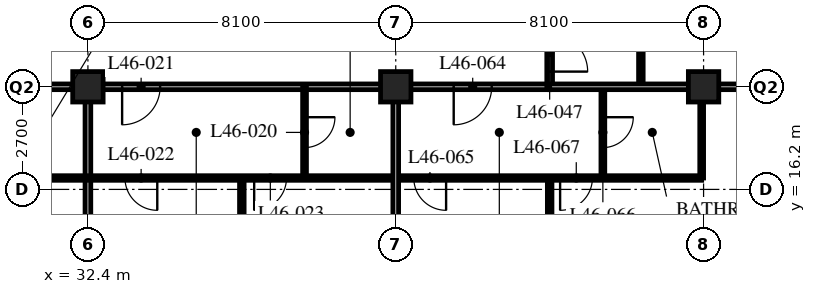
"""IFC4 building model, lengths in metres.
Left out: names, types, materials, properties, quantities, classifications, styles, units other than length and angle.
Written with IfcOpenShell. Run it as: python <this file> out.ifc"""

import sys

from ifc_helpers import new_model, si_unit, direction, frame, frame_2d, origin, origin_2d, place, context, subcontext, project, spatial, rectangle, hollow_rectangle, extrude, element, fill, save


model = new_model("IFC4")
c1 = context("Model", 3, precision=1e-05, world=origin(), true_north=direction((0.0, 1.0)))
c2 = subcontext(c1, "Body", "Model", "MODEL_VIEW")
j1 = project(units=[si_unit("LENGTHUNIT", "METRE"), si_unit("PLANEANGLEUNIT", "RADIAN")], contexts=[c1])
p1 = place(None, origin())
s1 = spatial("IfcSite", under=j1, at=p1, CompositionType="ELEMENT")
p2 = place(p1, origin())
s2 = spatial("IfcBuilding", under=s1, at=p2, CompositionType="ELEMENT")
p3 = place(p2, frame((0.0, 0.0, 181.2)))
s3 = spatial("IfcBuildingStorey", under=s2, at=p3, CompositionType="ELEMENT", Elevation=181.2)
for number, where, z_axis, x_axis in (
    (1, (32.4, 18.9, 0.0), (0.0, 0.0, 1.0), (1.0, 0.0, 0.0)),
    (2, (40.5, 18.9, 0.0), (0.0, 0.0, 1.0), (1.0, 0.0, 0.0)),
    (3, (48.6, 18.9, 0.0), (0.0, 0.0, 1.0), (1.0, 0.0, 0.0)),
):
    element("IfcColumn", number, at=place(p3, frame(where, z_axis=z_axis, x_axis=x_axis)), inside=s3, PredefinedType="COLUMN", context=c2, shape_type="SweptSolid", body=[
        extrude(hollow_rectangle(XDim=0.8, YDim=0.8, WallThickness=0.08, at=origin_2d()), origin(), (0.0, 0.0, 1.0), 3.6),
    ])
p4 = place(p3, frame((12.15, 18.9, 0.0), z_axis=(0.0, 0.0, 1.0), x_axis=(1.0, 0.0, 0.0)))
e4 = element("IfcWall", 4, at=p4, inside=s3, PredefinedType="PARTITIONING", context=c2, shape_type="SweptSolid", body=[
    extrude(rectangle(XDim=32.4, YDim=0.15, at=frame_2d((16.2, 0.0))), origin(), (0.0, 0.0, 1.0), 2.778),
])
p5 = place(p4, frame((4.95, 0.0, 0.0)))
e5 = element("IfcOpeningElement", 5, at=p5, cuts=e4, PredefinedType="OPENING", context=c2, shape_type="SweptSolid", body=[
    extrude(rectangle(XDim=1.0, YDim=2.1, at=frame_2d((0.5, 1.05))), frame((0.0, 0.085, 0.0), z_axis=(0.0, -1.0, 0.0), x_axis=(1.0, 0.0, 0.0)), (0.0, 0.0, 1.0), 0.17),
])
p6 = place(p4, frame((13.05, 0.0, 0.0)))
e6 = element("IfcOpeningElement", 6, at=p6, cuts=e4, PredefinedType="OPENING", context=c2, shape_type="SweptSolid", body=[
    extrude(rectangle(XDim=1.0, YDim=2.1, at=frame_2d((0.5, 1.05))), frame((0.0, 0.085, 0.0), z_axis=(0.0, -1.0, 0.0), x_axis=(1.0, 0.0, 0.0)), (0.0, 0.0, 1.0), 0.17),
])
p7 = place(p4, frame((21.15, 0.0, 0.0)))
e7 = element("IfcOpeningElement", 7, at=p7, cuts=e4, PredefinedType="OPENING", context=c2, shape_type="SweptSolid", body=[
    extrude(rectangle(XDim=1.0, YDim=2.1, at=frame_2d((0.5, 1.05))), frame((0.0, 0.085, 0.0), z_axis=(0.0, -1.0, 0.0), x_axis=(1.0, 0.0, 0.0)), (0.0, 0.0, 1.0), 0.17),
])
p8 = place(p4, frame((1.525, 0.0, 0.0)))
e8 = element("IfcOpeningElement", 8, at=p8, cuts=e4, PredefinedType="OPENING", context=c2, shape_type="SweptSolid", body=[
    extrude(rectangle(XDim=1.0, YDim=2.1, at=frame_2d((0.5, 1.05))), frame((0.0, 0.085, 0.0), z_axis=(0.0, -1.0, 0.0), x_axis=(1.0, 0.0, 0.0)), (0.0, 0.0, 1.0), 0.17),
])
p9 = place(p4, frame((29.875, 0.0, 0.0)))
e9 = element("IfcOpeningElement", 9, at=p9, cuts=e4, PredefinedType="OPENING", context=c2, shape_type="SweptSolid", body=[
    extrude(rectangle(XDim=1.0, YDim=2.1, at=frame_2d((0.5, 1.05))), frame((0.0, 0.085, 0.0), z_axis=(0.0, -1.0, 0.0), x_axis=(1.0, 0.0, 0.0)), (0.0, 0.0, 1.0), 0.17),
])
p10 = place(p3, frame((44.55, 18.9, 0.0), z_axis=(0.0, 0.0, 1.0), x_axis=(0.0, 1.0, 0.0)))
e10 = element("IfcWall", 10, at=p10, inside=s3, PredefinedType="PARTITIONING", context=c2, shape_type="SweptSolid", body=[
    extrude(rectangle(XDim=28.35, YDim=0.15, at=frame_2d((14.175, 0.0))), origin(), (0.0, 0.0, 1.0), 3.39),
])
p11 = place(p10, frame((0.4, 0.0, 0.0)))
e11 = element("IfcOpeningElement", 11, at=p11, cuts=e10, PredefinedType="OPENING", context=c2, shape_type="SweptSolid", body=[
    extrude(rectangle(XDim=1.0, YDim=2.1, at=frame_2d((0.5, 1.05))), frame((0.0, 0.085, 0.0), z_axis=(0.0, -1.0, 0.0), x_axis=(1.0, 0.0, 0.0)), (0.0, 0.0, 1.0), 0.17),
])
p12 = place(p10, frame((10.45, 0.0, 0.0)))
e12 = element("IfcOpeningElement", 12, at=p12, cuts=e10, PredefinedType="OPENING", context=c2, shape_type="SweptSolid", body=[
    extrude(rectangle(XDim=1.0, YDim=2.1, at=frame_2d((0.5, 1.05))), frame((0.0, 0.085, 0.0), z_axis=(0.0, -1.0, 0.0), x_axis=(1.0, 0.0, 0.0)), (0.0, 0.0, 1.0), 0.17),
])
p13 = place(p10, frame((14.5, 0.0, 0.0)))
e13 = element("IfcOpeningElement", 13, at=p13, cuts=e10, PredefinedType="OPENING", context=c2, shape_type="SweptSolid", body=[
    extrude(rectangle(XDim=1.0, YDim=2.1, at=frame_2d((0.5, 1.05))), frame((0.0, 0.085, 0.0), z_axis=(0.0, -1.0, 0.0), x_axis=(1.0, 0.0, 0.0)), (0.0, 0.0, 1.0), 0.17),
])
p14 = place(p10, frame((16.6, 0.0, 0.0)))
e14 = element("IfcOpeningElement", 14, at=p14, cuts=e10, PredefinedType="OPENING", context=c2, shape_type="SweptSolid", body=[
    extrude(rectangle(XDim=1.0, YDim=2.1, at=frame_2d((0.5, 1.05))), frame((0.0, 0.085, 0.0), z_axis=(0.0, -1.0, 0.0), x_axis=(1.0, 0.0, 0.0)), (0.0, 0.0, 1.0), 0.17),
])
p15 = place(p10, frame((26.65, 0.0, 0.0)))
e15 = element("IfcOpeningElement", 15, at=p15, cuts=e10, PredefinedType="OPENING", context=c2, shape_type="SweptSolid", body=[
    extrude(rectangle(XDim=1.0, YDim=2.1, at=frame_2d((0.5, 1.05))), frame((0.0, 0.085, 0.0), z_axis=(0.0, -1.0, 0.0), x_axis=(1.0, 0.0, 0.0)), (0.0, 0.0, 1.0), 0.17),
])
p16 = place(p3, frame((32.4, 18.9, 0.0), z_axis=(0.0, 0.0, 1.0), x_axis=(0.0, -1.0, 0.0)))
e16 = element("IfcWall", 16, at=p16, inside=s3, PredefinedType="PARTITIONING", context=c2, shape_type="SweptSolid", body=[
    extrude(rectangle(XDim=7.8, YDim=0.15, at=frame_2d((3.9, 0.0))), origin(), (0.0, 0.0, 1.0), 2.778),
])
p17 = place(p3, frame((38.1, 18.9, 0.0), z_axis=(0.0, 0.0, 1.0), x_axis=(0.0, -1.0, 0.0)))
e17 = element("IfcWall", 17, at=p17, inside=s3, PredefinedType="PARTITIONING", context=c2, shape_type="SweptSolid", body=[
    extrude(rectangle(XDim=2.4, YDim=0.1, at=frame_2d((1.2, 0.0))), origin(), (0.0, 0.0, 1.0), 3.39),
])
p18 = place(p17, frame((0.8, 0.0, 0.0)))
e18 = element("IfcOpeningElement", 18, at=p18, cuts=e17, PredefinedType="OPENING", context=c2, shape_type="SweptSolid", body=[
    extrude(rectangle(XDim=0.8, YDim=2.1, at=frame_2d((0.4, 1.05))), frame((0.0, 0.06, 0.0), z_axis=(0.0, -1.0, 0.0), x_axis=(1.0, 0.0, 0.0)), (0.0, 0.0, 1.0), 0.12),
])
p19 = place(p3, frame((36.45, 16.5, 0.0), z_axis=(0.0, 0.0, 1.0), x_axis=(0.0, -1.0, 0.0)))
e19 = element("IfcWall", 19, at=p19, inside=s3, PredefinedType="PARTITIONING", context=c2, shape_type="SweptSolid", body=[
    extrude(rectangle(XDim=5.4, YDim=0.12, at=frame_2d((2.7, 0.0))), origin(), (0.0, 0.0, 1.0), 3.39),
])
p20 = place(p3, frame((46.95, 18.9, 0.0), z_axis=(0.0, 0.0, 1.0), x_axis=(0.0, 1.0, 0.0)))
e20 = element("IfcWall", 20, at=p20, inside=s3, PredefinedType="PARTITIONING", context=c2, shape_type="SweptSolid", body=[
    extrude(rectangle(XDim=8.1, YDim=0.12, at=frame_2d((4.05, 0.0))), origin(), (0.0, 0.0, 1.0), 3.39),
])
p21 = place(p20, frame((0.975, 0.0, 0.0)))
e21 = element("IfcOpeningElement", 21, at=p21, cuts=e20, PredefinedType="OPENING", context=c2, shape_type="SweptSolid", body=[
    extrude(rectangle(XDim=0.85, YDim=2.1, at=frame_2d((0.425, 1.05))), frame((0.0, 0.07, 0.0), z_axis=(0.0, -1.0, 0.0), x_axis=(1.0, 0.0, 0.0)), (0.0, 0.0, 1.0), 0.14),
])
p22 = place(p20, frame((4.375, 0.0, 0.0)))
e22 = element("IfcOpeningElement", 22, at=p22, cuts=e20, PredefinedType="OPENING", context=c2, shape_type="SweptSolid", body=[
    extrude(rectangle(XDim=0.85, YDim=2.1, at=frame_2d((0.425, 1.05))), frame((0.0, 0.07, 0.0), z_axis=(0.0, -1.0, 0.0), x_axis=(1.0, 0.0, 0.0)), (0.0, 0.0, 1.0), 0.14),
])
p23 = place(p3, frame((8.15, 16.5, 0.0), z_axis=(0.0, 0.0, 1.0), x_axis=(1.0, 0.0, 0.0)))
e23 = element("IfcWall", 23, at=p23, inside=s3, PredefinedType="PARTITIONING", context=c2, shape_type="SweptSolid", body=[
    extrude(rectangle(XDim=40.4, YDim=0.12, at=frame_2d((20.2, 0.0))), origin(), (0.0, 0.0, 1.0), 3.39),
])
p24 = place(p23, frame((9.025, 0.0, 0.0)))
e24 = element("IfcOpeningElement", 24, at=p24, cuts=e23, PredefinedType="OPENING", context=c2, shape_type="SweptSolid", body=[
    extrude(rectangle(XDim=0.85, YDim=2.1, at=frame_2d((0.425, 1.05))), frame((0.0, 0.07, 0.0), z_axis=(0.0, -1.0, 0.0), x_axis=(1.0, 0.0, 0.0)), (0.0, 0.0, 1.0), 0.14),
])
p25 = place(p23, frame((12.425, 0.0, 0.0)))
e25 = element("IfcOpeningElement", 25, at=p25, cuts=e23, PredefinedType="OPENING", context=c2, shape_type="SweptSolid", body=[
    extrude(rectangle(XDim=0.85, YDim=2.1, at=frame_2d((0.425, 1.05))), frame((0.0, 0.07, 0.0), z_axis=(0.0, -1.0, 0.0), x_axis=(1.0, 0.0, 0.0)), (0.0, 0.0, 1.0), 0.14),
])
p26 = place(p23, frame((17.125, 0.0, 0.0)))
e26 = element("IfcOpeningElement", 26, at=p26, cuts=e23, PredefinedType="OPENING", context=c2, shape_type="SweptSolid", body=[
    extrude(rectangle(XDim=0.85, YDim=2.1, at=frame_2d((0.425, 1.05))), frame((0.0, 0.07, 0.0), z_axis=(0.0, -1.0, 0.0), x_axis=(1.0, 0.0, 0.0)), (0.0, 0.0, 1.0), 0.14),
])
p27 = place(p23, frame((20.525, 0.0, 0.0)))
e27 = element("IfcOpeningElement", 27, at=p27, cuts=e23, PredefinedType="OPENING", context=c2, shape_type="SweptSolid", body=[
    extrude(rectangle(XDim=0.85, YDim=2.1, at=frame_2d((0.425, 1.05))), frame((0.0, 0.07, 0.0), z_axis=(0.0, -1.0, 0.0), x_axis=(1.0, 0.0, 0.0)), (0.0, 0.0, 1.0), 0.14),
])
p28 = place(p23, frame((25.225, 0.0, 0.0)))
e28 = element("IfcOpeningElement", 28, at=p28, cuts=e23, PredefinedType="OPENING", context=c2, shape_type="SweptSolid", body=[
    extrude(rectangle(XDim=0.85, YDim=2.1, at=frame_2d((0.425, 1.05))), frame((0.0, 0.07, 0.0), z_axis=(0.0, -1.0, 0.0), x_axis=(1.0, 0.0, 0.0)), (0.0, 0.0, 1.0), 0.14),
])
p29 = place(p23, frame((28.625, 0.0, 0.0)))
e29 = element("IfcOpeningElement", 29, at=p29, cuts=e23, PredefinedType="OPENING", context=c2, shape_type="SweptSolid", body=[
    extrude(rectangle(XDim=0.85, YDim=2.1, at=frame_2d((0.425, 1.05))), frame((0.0, 0.07, 0.0), z_axis=(0.0, -1.0, 0.0), x_axis=(1.0, 0.0, 0.0)), (0.0, 0.0, 1.0), 0.14),
])
p30 = place(p23, frame((6.725, 0.0, 0.0)))
e30 = element("IfcOpeningElement", 30, at=p30, cuts=e23, PredefinedType="OPENING", context=c2, shape_type="SweptSolid", body=[
    extrude(rectangle(XDim=0.85, YDim=2.1, at=frame_2d((0.425, 1.05))), frame((0.0, 0.07, 0.0), z_axis=(0.0, -1.0, 0.0), x_axis=(1.0, 0.0, 0.0)), (0.0, 0.0, 1.0), 0.14),
])
p31 = place(p23, frame((2.875, 0.0, 0.0)))
e31 = element("IfcOpeningElement", 31, at=p31, cuts=e23, PredefinedType="OPENING", context=c2, shape_type="SweptSolid", body=[
    extrude(rectangle(XDim=0.85, YDim=2.1, at=frame_2d((0.425, 1.05))), frame((0.0, 0.07, 0.0), z_axis=(0.0, -1.0, 0.0), x_axis=(1.0, 0.0, 0.0)), (0.0, 0.0, 1.0), 0.14),
])
p32 = place(p23, frame((32.825, 0.0, 0.0)))
e32 = element("IfcOpeningElement", 32, at=p32, cuts=e23, PredefinedType="OPENING", context=c2, shape_type="SweptSolid", body=[
    extrude(rectangle(XDim=0.85, YDim=2.1, at=frame_2d((0.425, 1.05))), frame((0.0, 0.07, 0.0), z_axis=(0.0, -1.0, 0.0), x_axis=(1.0, 0.0, 0.0)), (0.0, 0.0, 1.0), 0.14),
])
p33 = place(p23, frame((36.675, 0.0, 0.0)))
e33 = element("IfcOpeningElement", 33, at=p33, cuts=e23, PredefinedType="OPENING", context=c2, shape_type="SweptSolid", body=[
    extrude(rectangle(XDim=0.85, YDim=2.1, at=frame_2d((0.425, 1.05))), frame((0.0, 0.07, 0.0), z_axis=(0.0, -1.0, 0.0), x_axis=(1.0, 0.0, 0.0)), (0.0, 0.0, 1.0), 0.14),
])
p34 = place(p3, frame((45.95, 18.9, 0.0), z_axis=(0.0, 0.0, 1.0), x_axis=(0.0, -1.0, 0.0)))
e34 = element("IfcWall", 34, at=p34, inside=s3, PredefinedType="PARTITIONING", context=c2, shape_type="SweptSolid", body=[
    extrude(rectangle(XDim=2.4, YDim=0.1, at=frame_2d((1.2, 0.0))), origin(), (0.0, 0.0, 1.0), 3.39),
])
p35 = place(p34, frame((0.8, 0.0, 0.0)))
e35 = element("IfcOpeningElement", 35, at=p35, cuts=e34, PredefinedType="OPENING", context=c2, shape_type="SweptSolid", body=[
    extrude(rectangle(XDim=0.8, YDim=2.1, at=frame_2d((0.4, 1.05))), frame((0.0, 0.06, 0.0), z_axis=(0.0, -1.0, 0.0), x_axis=(1.0, 0.0, 0.0)), (0.0, 0.0, 1.0), 0.12),
])
p36 = place(p3, frame((48.55, 18.9, 0.0), z_axis=(0.0, 0.0, 1.0), x_axis=(0.0, -1.0, 0.0)))
e36 = element("IfcWall", 36, at=p36, inside=s3, PredefinedType="PARTITIONING", context=c2, shape_type="SweptSolid", body=[
    extrude(rectangle(XDim=2.4, YDim=0.1, at=frame_2d((1.2, 0.0))), origin(), (0.0, 0.0, 1.0), 2.778),
])
p37 = place(p3, frame((44.55, 16.5, 0.0), z_axis=(0.0, 0.0, 1.0), x_axis=(0.0, -1.0, 0.0)))
e37 = element("IfcWall", 37, at=p37, inside=s3, PredefinedType="PARTITIONING", context=c2, shape_type="SweptSolid", body=[
    extrude(rectangle(XDim=5.4, YDim=0.12, at=frame_2d((2.7, 0.0))), origin(), (0.0, 0.0, 1.0), 3.39),
])
p38 = place(p3, frame((44.55, 18.9, 0.0), z_axis=(0.0, 0.0, 1.0), x_axis=(1.0, 0.0, 0.0)))
e38 = element("IfcWall", 38, at=p38, inside=s3, PredefinedType="PARTITIONING", context=c2, shape_type="SweptSolid", body=[
    extrude(rectangle(XDim=7.8, YDim=0.15, at=frame_2d((3.9, 0.0))), origin(), (0.0, 0.0, 1.0), 2.778),
])
p39 = place(p3, frame((40.5, 18.9, 0.0), z_axis=(0.0, 0.0, 1.0), x_axis=(0.0, -1.0, 0.0)))
e39 = element("IfcWall", 39, at=p39, inside=s3, PredefinedType="PARTITIONING", context=c2, shape_type="SweptSolid", body=[
    extrude(rectangle(XDim=7.8, YDim=0.15, at=frame_2d((3.9, 0.0))), origin(), (0.0, 0.0, 1.0), 2.778),
])
p40 = place(p18, origin())
e40 = element("IfcDoor", 40, at=p40, inside=s3, OperationType="SINGLE_SWING_LEFT", PredefinedType="DOOR", context=c2, shape_type="SweptSolid", body=[
    extrude(rectangle(XDim=0.8, YDim=2.1, at=frame_2d((0.4, 1.05))), frame((0.0, 0.025, 0.0), z_axis=(0.0, -1.0, 0.0), x_axis=(1.0, 0.0, 0.0)), (0.0, 0.0, 1.0), 0.05),
])
fill(e18, e40)
p41 = place(p7, origin())
e41 = element("IfcDoor", 41, at=p41, inside=s3, OperationType="SINGLE_SWING_RIGHT", PredefinedType="DOOR", context=c2, shape_type="SweptSolid", body=[
    extrude(rectangle(XDim=1.0, YDim=2.1, at=frame_2d((0.5, 1.05))), frame((0.0, 0.025, 0.0), z_axis=(0.0, -1.0, 0.0), x_axis=(1.0, 0.0, 0.0)), (0.0, 0.0, 1.0), 0.05),
])
fill(e7, e41)
p42 = place(p28, origin())
e42 = element("IfcDoor", 42, at=p42, inside=s3, OperationType="SINGLE_SWING_LEFT", PredefinedType="DOOR", context=c2, shape_type="SweptSolid", body=[
    extrude(rectangle(XDim=0.85, YDim=2.1, at=frame_2d((0.425, 1.05))), frame((0.0, 0.025, 0.0), z_axis=(0.0, -1.0, 0.0), x_axis=(1.0, 0.0, 0.0)), (0.0, 0.0, 1.0), 0.05),
])
fill(e28, e42)
p43 = place(p29, origin())
e43 = element("IfcDoor", 43, at=p43, inside=s3, OperationType="SINGLE_SWING_RIGHT", PredefinedType="DOOR", context=c2, shape_type="SweptSolid", body=[
    extrude(rectangle(XDim=0.85, YDim=2.1, at=frame_2d((0.425, 1.05))), frame((0.0, 0.025, 0.0), z_axis=(0.0, -1.0, 0.0), x_axis=(1.0, 0.0, 0.0)), (0.0, 0.0, 1.0), 0.05),
])
fill(e29, e43)
p44 = place(p11, origin())
e44 = element("IfcDoor", 44, at=p44, inside=s3, OperationType="SINGLE_SWING_RIGHT", PredefinedType="DOOR", context=c2, shape_type="SweptSolid", body=[
    extrude(rectangle(XDim=1.0, YDim=2.1, at=frame_2d((0.5, 1.05))), frame((0.0, 0.025, 0.0), z_axis=(0.0, -1.0, 0.0), x_axis=(1.0, 0.0, 0.0)), (0.0, 0.0, 1.0), 0.05),
])
fill(e11, e44)
p45 = place(p9, origin())
e45 = element("IfcDoor", 45, at=p45, inside=s3, OperationType="SINGLE_SWING_RIGHT", PredefinedType="DOOR", context=c2, shape_type="SweptSolid", body=[
    extrude(rectangle(XDim=1.0, YDim=2.1, at=frame_2d((0.5, 1.05))), frame((0.0, 0.025, 0.0), z_axis=(0.0, -1.0, 0.0), x_axis=(1.0, 0.0, 0.0)), (0.0, 0.0, 1.0), 0.05),
])
fill(e9, e45)
p46 = place(p32, origin())
e46 = element("IfcDoor", 46, at=p46, inside=s3, OperationType="SINGLE_SWING_LEFT", PredefinedType="DOOR", context=c2, shape_type="SweptSolid", body=[
    extrude(rectangle(XDim=0.85, YDim=2.1, at=frame_2d((0.425, 1.05))), frame((0.0, 0.025, 0.0), z_axis=(0.0, -1.0, 0.0), x_axis=(1.0, 0.0, 0.0)), (0.0, 0.0, 1.0), 0.05),
])
fill(e32, e46)
p47 = place(p35, origin())
e47 = element("IfcDoor", 47, at=p47, inside=s3, OperationType="SINGLE_SWING_LEFT", PredefinedType="DOOR", context=c2, shape_type="SweptSolid", body=[
    extrude(rectangle(XDim=0.8, YDim=2.1, at=frame_2d((0.4, 1.05))), frame((0.0, 0.025, 0.0), z_axis=(0.0, -1.0, 0.0), x_axis=(1.0, 0.0, 0.0)), (0.0, 0.0, 1.0), 0.05),
])
fill(e35, e47)
p48 = place(p33, origin())
e48 = element("IfcDoor", 48, at=p48, inside=s3, OperationType="SINGLE_SWING_RIGHT", PredefinedType="DOOR", context=c2, shape_type="SweptSolid", body=[
    extrude(rectangle(XDim=0.85, YDim=2.1, at=frame_2d((0.425, 1.05))), frame((0.0, 0.025, 0.0), z_axis=(0.0, -1.0, 0.0), x_axis=(1.0, 0.0, 0.0)), (0.0, 0.0, 1.0), 0.05),
])
fill(e33, e48)
save(model, sys.argv[1])
